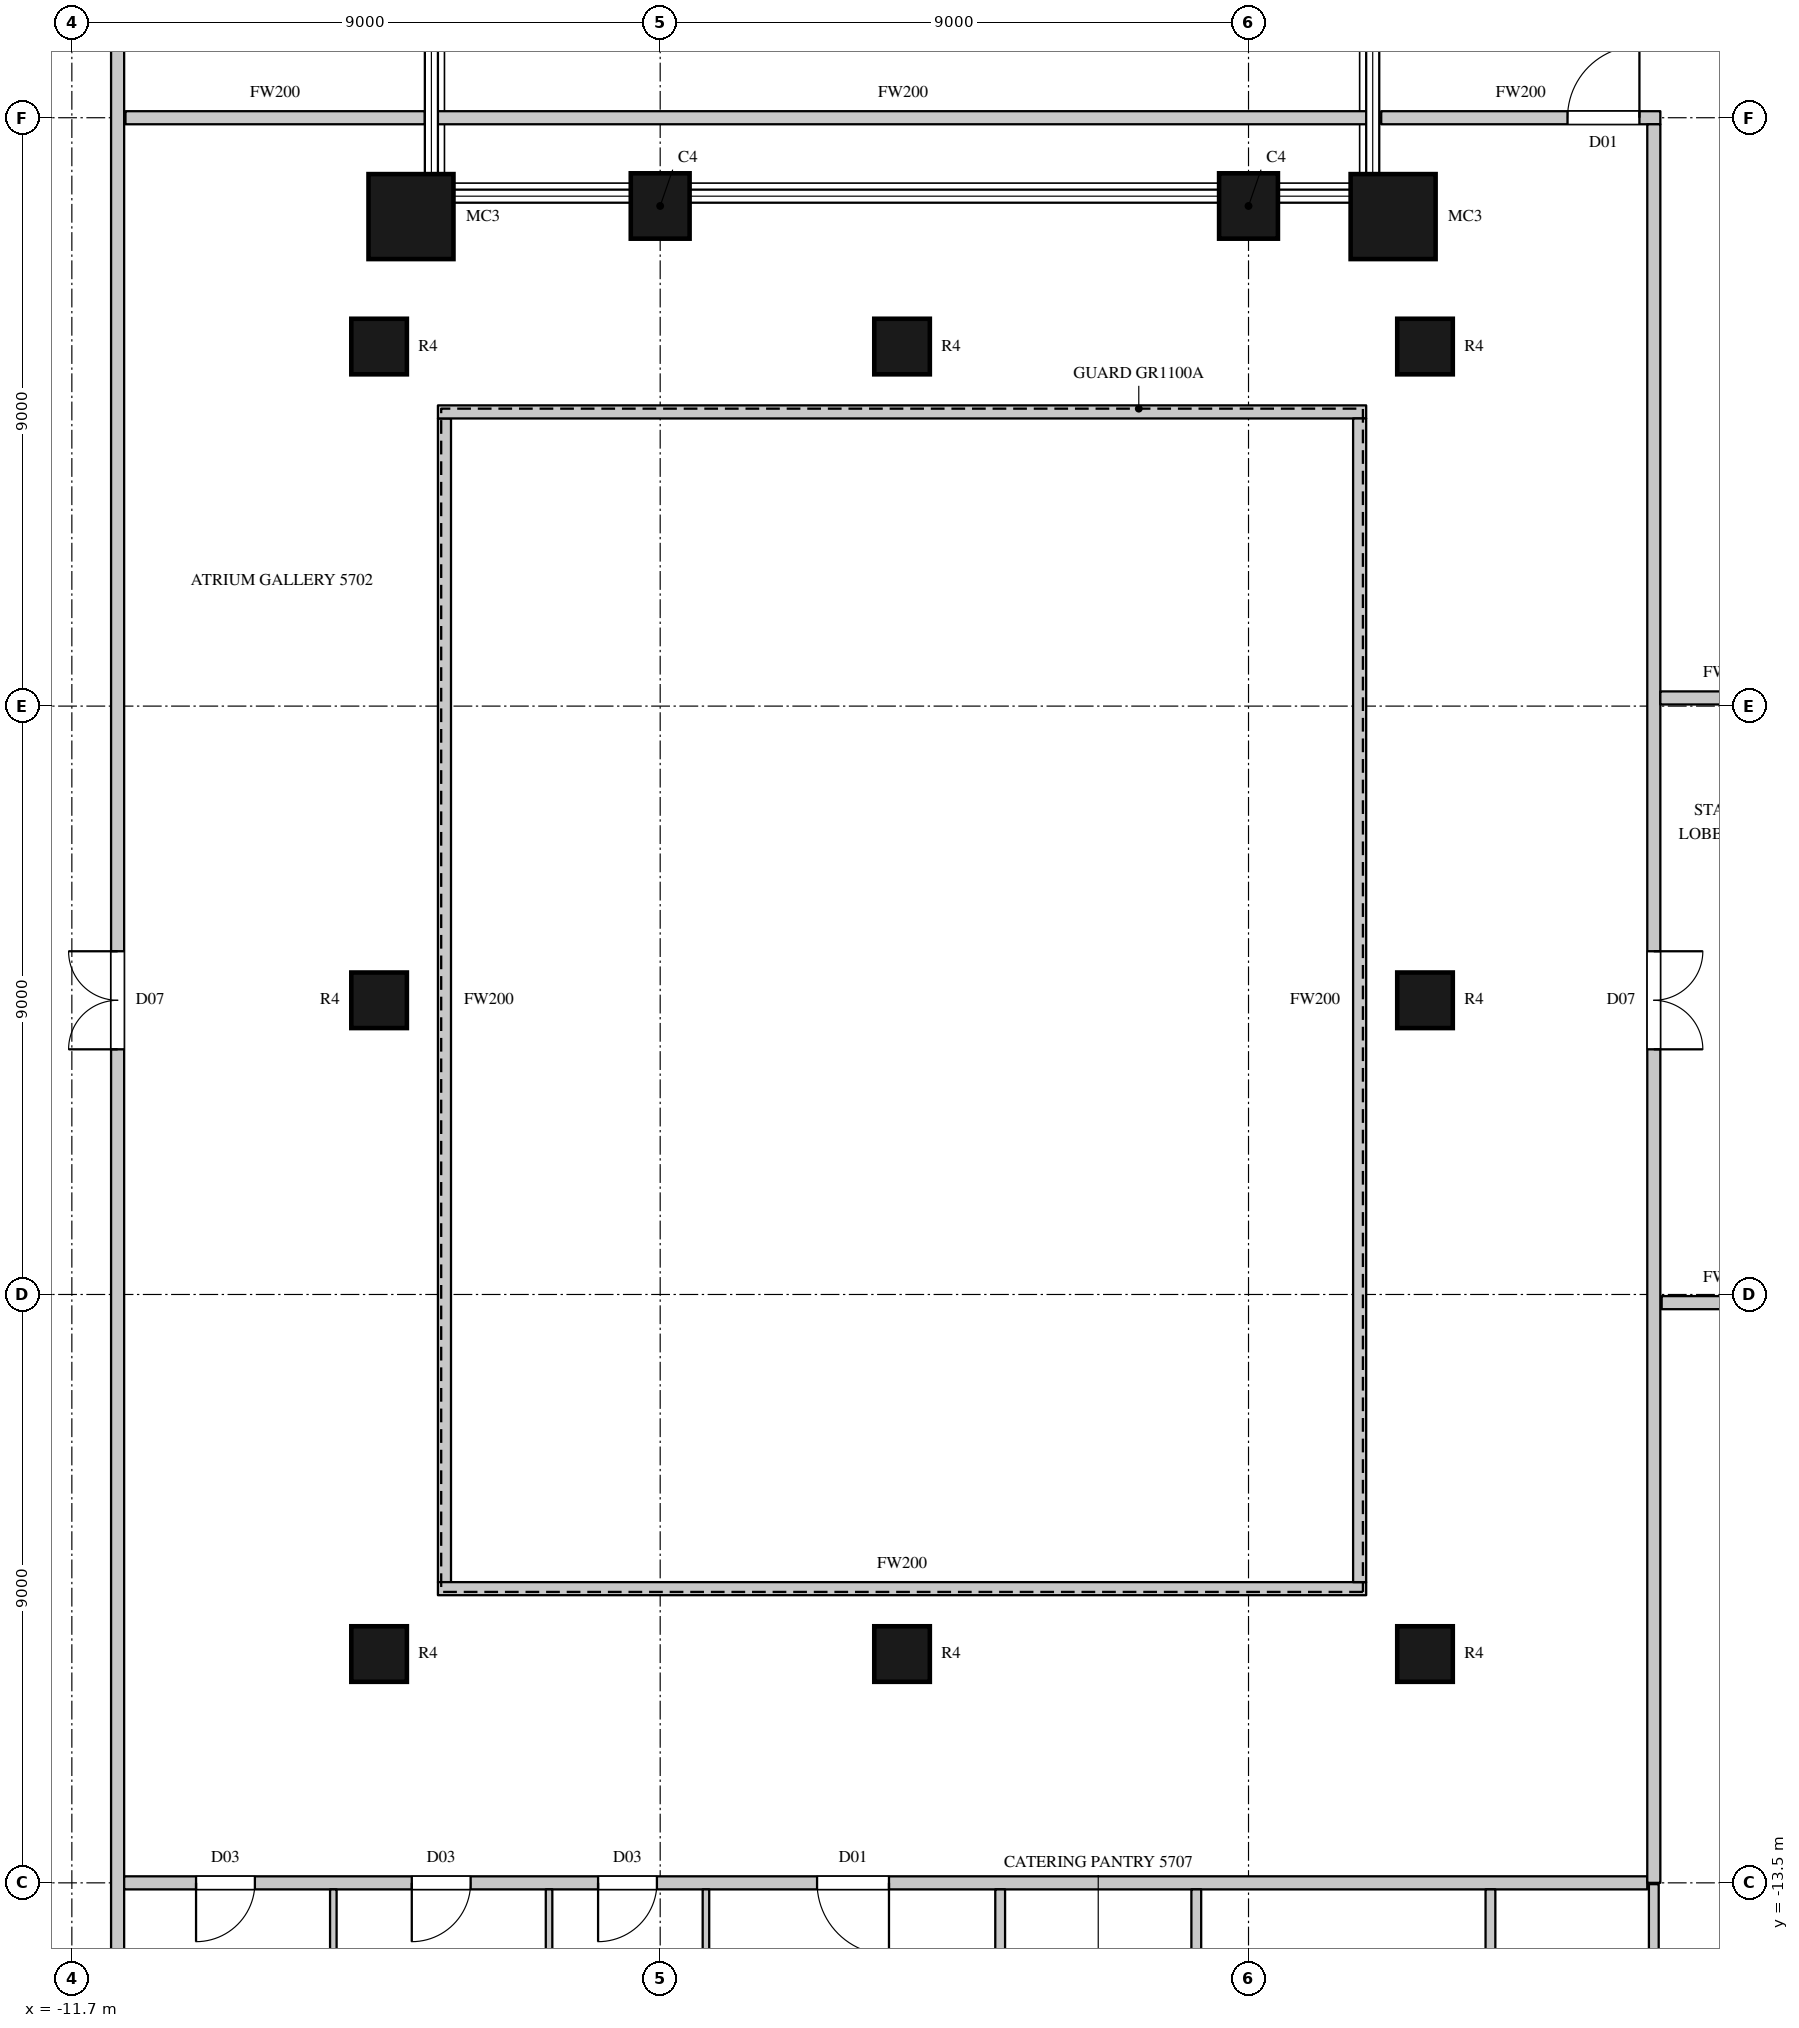
"""IFC4 building model, lengths in metres.
Left out: names, types, materials, properties, quantities, classifications, styles, units other than length and angle.
Written with IfcOpenShell. Run it as: python <this file> out.ifc"""

import sys

from ifc_helpers import new_model, si_unit, direction, frame, frame_2d, origin, origin_2d, place, context, subcontext, project, spatial, rectangle, circle, extrude, element, fill, save


model = new_model("IFC4")
c1 = context("Model", 3, precision=1e-05, world=origin(), true_north=direction((0.0, 1.0)))
c2 = subcontext(c1, "Body", "Model", "MODEL_VIEW")
j1 = project(units=[si_unit("LENGTHUNIT", "METRE"), si_unit("PLANEANGLEUNIT", "RADIAN")], contexts=[c1])
p1 = place(None, origin())
s1 = spatial("IfcSite", under=j1, at=p1, CompositionType="ELEMENT")
p2 = place(p1, origin())
s2 = spatial("IfcBuilding", under=s1, at=p2, CompositionType="ELEMENT")
p3 = place(p2, frame((0.0, 0.0, 255.7)))
s3 = spatial("IfcBuildingStorey", under=s2, at=p3, CompositionType="ELEMENT", Elevation=255.7)
p4 = place(p3, frame((8.512, 11.988, 0.0), z_axis=(0.0, 0.0, 1.0), x_axis=(1.0, 0.0, 0.0)))
e1 = element("IfcColumn", 1, at=p4, inside=s3, PredefinedType="COLUMN", context=c2, shape_type="SweptSolid", body=[
    extrude(circle(Radius=0.65, at=origin_2d()), origin(), (0.0, 0.0, 1.0), 4.1),
])
for number, where, z_axis, x_axis in (
    (2, (6.3, 12.15, 0.0), (0.0, 0.0, 1.0), (-1.0, 0.0, 0.0)),
    (3, (-2.7, 12.15, 0.0), (0.0, 0.0, 1.0), (-1.0, 0.0, 0.0)),
):
    element("IfcColumn", number, at=place(p3, frame(where, z_axis=z_axis, x_axis=x_axis)), inside=s3, PredefinedType="COLUMN", context=c2, shape_type="SweptSolid", body=[
        extrude(rectangle(XDim=0.9, YDim=1.0, at=origin_2d()), origin(), (0.0, 0.0, 1.0), 4.1),
    ])
p5 = place(p3, frame((-6.512, 11.988, 0.0), z_axis=(0.0, 0.0, 1.0), x_axis=(1.0, 0.0, 0.0)))
e4 = element("IfcColumn", 4, at=p5, inside=s3, PredefinedType="COLUMN", context=c2, shape_type="SweptSolid", body=[
    extrude(circle(Radius=0.65, at=origin_2d()), origin(), (0.0, 0.0, 1.0), 4.1),
])
for number, where, z_axis, x_axis in (
    (5, (-7.0, -10.0, 0.0), (0.0, 0.0, 1.0), (1.0, 0.0, 0.0)),
    (6, (-7.0, 0.0, 0.0), (0.0, 0.0, 1.0), (1.0, 0.0, 0.0)),
    (7, (-7.0, 10.0, 0.0), (0.0, 0.0, 1.0), (1.0, 0.0, 0.0)),
    (8, (1.0, -10.0, 0.0), (0.0, 0.0, 1.0), (1.0, 0.0, 0.0)),
    (9, (1.0, 10.0, 0.0), (0.0, 0.0, 1.0), (1.0, 0.0, 0.0)),
    (10, (9.0, -10.0, 0.0), (0.0, 0.0, 1.0), (1.0, 0.0, 0.0)),
    (11, (9.0, 0.0, 0.0), (0.0, 0.0, 1.0), (1.0, 0.0, 0.0)),
    (12, (9.0, 10.0, 0.0), (0.0, 0.0, 1.0), (1.0, 0.0, 0.0)),
):
    element("IfcColumn", number, at=place(p3, frame(where, z_axis=z_axis, x_axis=x_axis)), inside=s3, PredefinedType="COLUMN", context=c2, shape_type="SweptSolid", body=[
        extrude(circle(Radius=0.425, at=origin_2d()), origin(), (0.0, 0.0, 1.0), 4.1),
    ])
p6 = place(p3, frame((-11.0, -14.8, 0.0), z_axis=(0.0, 0.0, 1.0), x_axis=(0.0, 1.0, 0.0)))
e13 = element("IfcWall", 13, at=p6, inside=s3, PredefinedType="PARTITIONING", context=c2, shape_type="SweptSolid", body=[
    extrude(rectangle(XDim=29.5, YDim=0.2, at=frame_2d((14.75, 0.0))), origin(), (0.0, 0.0, 1.0), 3.8),
])
p7 = place(p6, frame((14.05, 0.0, 0.0)))
e14 = element("IfcOpeningElement", 14, at=p7, cuts=e13, PredefinedType="OPENING", context=c2, shape_type="SweptSolid", body=[
    extrude(rectangle(XDim=1.5, YDim=2.4, at=frame_2d((0.75, 1.2))), frame((0.0, 0.11, 0.0), z_axis=(0.0, -1.0, 0.0), x_axis=(1.0, 0.0, 0.0)), (0.0, 0.0, 1.0), 0.22),
])
p8 = place(p3, frame((-10.9, -13.5, 0.0), z_axis=(0.0, 0.0, 1.0), x_axis=(1.0, 0.0, 0.0)))
e15 = element("IfcWall", 15, at=p8, inside=s3, PredefinedType="PARTITIONING", context=c2, shape_type="SweptSolid", body=[
    extrude(rectangle(XDim=23.3, YDim=0.2, at=frame_2d((11.65, 0.0))), origin(), (0.0, 0.0, 1.0), 3.8),
])
p9 = place(p8, frame((1.1, 0.0, 0.0)))
e16 = element("IfcOpeningElement", 16, at=p9, cuts=e15, PredefinedType="OPENING", context=c2, shape_type="SweptSolid", body=[
    extrude(rectangle(XDim=0.9, YDim=2.2, at=frame_2d((0.45, 1.1))), frame((0.0, 0.11, 0.0), z_axis=(0.0, -1.0, 0.0), x_axis=(1.0, 0.0, 0.0)), (0.0, 0.0, 1.0), 0.22),
])
p10 = place(p8, frame((4.4, 0.0, 0.0)))
e17 = element("IfcOpeningElement", 17, at=p10, cuts=e15, PredefinedType="OPENING", context=c2, shape_type="SweptSolid", body=[
    extrude(rectangle(XDim=0.9, YDim=2.2, at=frame_2d((0.45, 1.1))), frame((0.0, 0.11, 0.0), z_axis=(0.0, -1.0, 0.0), x_axis=(1.0, 0.0, 0.0)), (0.0, 0.0, 1.0), 0.22),
])
p11 = place(p8, frame((7.25, 0.0, 0.0)))
e18 = element("IfcOpeningElement", 18, at=p11, cuts=e15, PredefinedType="OPENING", context=c2, shape_type="SweptSolid", body=[
    extrude(rectangle(XDim=0.9, YDim=2.2, at=frame_2d((0.45, 1.1))), frame((0.0, 0.11, 0.0), z_axis=(0.0, -1.0, 0.0), x_axis=(1.0, 0.0, 0.0)), (0.0, 0.0, 1.0), 0.22),
])
p12 = place(p8, frame((10.6, 0.0, 0.0)))
e19 = element("IfcOpeningElement", 19, at=p12, cuts=e15, PredefinedType="OPENING", context=c2, shape_type="SweptSolid", body=[
    extrude(rectangle(XDim=1.1, YDim=2.4, at=frame_2d((0.55, 1.2))), frame((0.0, 0.11, 0.0), z_axis=(0.0, -1.0, 0.0), x_axis=(1.0, 0.0, 0.0)), (0.0, 0.0, 1.0), 0.22),
])
p13 = place(p3, frame((-10.88, 13.5, 0.0), z_axis=(0.0, 0.0, 1.0), x_axis=(1.0, 0.0, 0.0)))
e20 = element("IfcWall", 20, at=p13, inside=s3, PredefinedType="PARTITIONING", context=c2, shape_type="SweptSolid", body=[
    extrude(rectangle(XDim=4.58, YDim=0.2, at=frame_2d((2.29, 0.0))), origin(), (0.0, 0.0, 1.0), 3.8),
])
p14 = place(p3, frame((-6.27, 13.5, 0.0), z_axis=(0.0, 0.0, 1.0), x_axis=(1.0, 0.0, 0.0)))
e21 = element("IfcWall", 21, at=p14, inside=s3, PredefinedType="PARTITIONING", context=c2, shape_type="SweptSolid", body=[
    extrude(rectangle(XDim=14.57, YDim=0.2, at=frame_2d((7.285, 0.0))), origin(), (0.0, 0.0, 1.0), 3.8),
])
p15 = place(p3, frame((-6.0, -8.9, 0.0), z_axis=(0.0, 0.0, 1.0), x_axis=(0.0, 1.0, 0.0)))
e22 = element("IfcWall", 22, at=p15, inside=s3, PredefinedType="PARTITIONING", context=c2, shape_type="SweptSolid", body=[
    extrude(rectangle(XDim=17.8, YDim=0.2, at=frame_2d((8.9, 0.0))), origin(), (0.0, 0.0, 1.0), 3.8),
])
for number, where, z_axis, x_axis in (
    (23, (-6.1, -9.0, 0.0), (0.0, 0.0, 1.0), (1.0, 0.0, 0.0)),
    (24, (-6.1, 9.0, 0.0), (0.0, 0.0, 1.0), (1.0, 0.0, 0.0)),
):
    element("IfcWall", number, at=place(p3, frame(where, z_axis=z_axis, x_axis=x_axis)), inside=s3, PredefinedType="PARTITIONING", context=c2, shape_type="SweptSolid", body=[
        extrude(rectangle(XDim=14.2, YDim=0.2, at=frame_2d((7.1, 0.0))), origin(), (0.0, 0.0, 1.0), 3.8),
    ])
p16 = place(p3, frame((8.0, -8.9, 0.0), z_axis=(0.0, 0.0, 1.0), x_axis=(0.0, 1.0, 0.0)))
e25 = element("IfcWall", 25, at=p16, inside=s3, PredefinedType="PARTITIONING", context=c2, shape_type="SweptSolid", body=[
    extrude(rectangle(XDim=17.8, YDim=0.2, at=frame_2d((8.9, 0.0))), origin(), (0.0, 0.0, 1.0), 3.8),
])
p17 = place(p3, frame((8.33, 13.5, 0.0), z_axis=(0.0, 0.0, 1.0), x_axis=(1.0, 0.0, 0.0)))
e26 = element("IfcWall", 26, at=p17, inside=s3, PredefinedType="PARTITIONING", context=c2, shape_type="SweptSolid", body=[
    extrude(rectangle(XDim=4.27, YDim=0.2, at=frame_2d((2.135, 0.0))), origin(), (0.0, 0.0, 1.0), 3.8),
])
p18 = place(p17, frame((2.85, 0.0, 0.0)))
e27 = element("IfcOpeningElement", 27, at=p18, cuts=e26, PredefinedType="OPENING", context=c2, shape_type="SweptSolid", body=[
    extrude(rectangle(XDim=1.1, YDim=2.4, at=frame_2d((0.55, 1.2))), frame((0.0, 0.11, 0.0), z_axis=(0.0, -1.0, 0.0), x_axis=(1.0, 0.0, 0.0)), (0.0, 0.0, 1.0), 0.22),
])
p19 = place(p3, frame((12.5, -13.5, 0.0), z_axis=(0.0, 0.0, 1.0), x_axis=(0.0, 1.0, 0.0)))
e28 = element("IfcWall", 28, at=p19, inside=s3, PredefinedType="PARTITIONING", context=c2, shape_type="SweptSolid", body=[
    extrude(rectangle(XDim=26.9, YDim=0.2, at=frame_2d((13.45, 0.0))), origin(), (0.0, 0.0, 1.0), 3.8),
])
p20 = place(p19, frame((12.75, 0.0, 0.0)))
e29 = element("IfcOpeningElement", 29, at=p20, cuts=e28, PredefinedType="OPENING", context=c2, shape_type="SweptSolid", body=[
    extrude(rectangle(XDim=1.5, YDim=2.4, at=frame_2d((0.75, 1.2))), frame((0.0, 0.11, 0.0), z_axis=(0.0, -1.0, 0.0), x_axis=(1.0, 0.0, 0.0)), (0.0, 0.0, 1.0), 0.22),
])
p21 = place(p3, frame((12.6, 4.625, 0.0), z_axis=(0.0, 0.0, 1.0), x_axis=(1.0, 0.0, 0.0)))
e30 = element("IfcWall", 30, at=p21, inside=s3, PredefinedType="PARTITIONING", context=c2, shape_type="SweptSolid", body=[
    extrude(rectangle(XDim=2.075, YDim=0.2, at=frame_2d((1.038, 0.0))), origin(), (0.0, 0.0, 1.0), 3.8),
])
p22 = place(p3, frame((12.62, -4.625, 0.0), z_axis=(0.0, 0.0, 1.0), x_axis=(1.0, 0.0, 0.0)))
e31 = element("IfcWall", 31, at=p22, inside=s3, PredefinedType="PARTITIONING", context=c2, shape_type="SweptSolid", body=[
    extrude(rectangle(XDim=2.035, YDim=0.2, at=frame_2d((1.018, 0.0))), origin(), (0.0, 0.0, 1.0), 3.8),
])
p23 = place(p3, frame((2.501, -17.625, 0.0), z_axis=(0.0, 0.0, 1.0), x_axis=(0.0, 1.0, 0.0)))
e32 = element("IfcWall", 32, at=p23, inside=s3, PredefinedType="PARTITIONING", context=c2, shape_type="SweptSolid", body=[
    extrude(rectangle(XDim=4.025, YDim=0.15, at=frame_2d((2.012, 0.0))), origin(), (0.0, 0.0, 1.0), 3.8),
])
p24 = place(p23, frame((1.55, 0.0, 0.0)))
e33 = element("IfcOpeningElement", 33, at=p24, cuts=e32, PredefinedType="OPENING", context=c2, shape_type="SweptSolid", body=[
    extrude(rectangle(XDim=0.95, YDim=2.2, at=frame_2d((0.475, 1.1))), frame((0.0, 0.085, 0.0), z_axis=(0.0, -1.0, 0.0), x_axis=(1.0, 0.0, 0.0)), (0.0, 0.0, 1.0), 0.17),
])
for number, where, z_axis, x_axis in (
    (34, (5.501, -17.625, 0.0), (0.0, 0.0, 1.0), (0.0, 1.0, 0.0)),
    (35, (10.001, -17.625, 0.0), (0.0, 0.0, 1.0), (0.0, 1.0, 0.0)),
):
    element("IfcWall", number, at=place(p3, frame(where, z_axis=z_axis, x_axis=x_axis)), inside=s3, PredefinedType="PARTITIONING", context=c2, shape_type="SweptSolid", body=[
        extrude(rectangle(XDim=4.025, YDim=0.15, at=frame_2d((2.012, 0.0))), origin(), (0.0, 0.0, 1.0), 3.8),
    ])
p25 = place(p3, frame((12.5, -20.095, 0.0), z_axis=(0.0, 0.0, 1.0), x_axis=(0.0, 1.0, 0.0)))
e36 = element("IfcWall", 36, at=p25, inside=s3, PredefinedType="PARTITIONING", context=c2, shape_type="SweptSolid", body=[
    extrude(rectangle(XDim=6.575, YDim=0.15, at=frame_2d((3.288, 0.0))), origin(), (0.0, 0.0, 1.0), 3.8),
])
for number, where, z_axis, x_axis in (
    (37, (-7.7, -24.04, 0.0), (0.0, 0.0, 1.0), (0.0, 1.0, 0.0)),
    (38, (-4.4, -24.04, 0.0), (0.0, 0.0, 1.0), (0.0, 1.0, 0.0)),
):
    element("IfcWall", number, at=place(p3, frame(where, z_axis=z_axis, x_axis=x_axis)), inside=s3, PredefinedType="PARTITIONING", context=c2, shape_type="SweptSolid", body=[
        extrude(rectangle(XDim=10.44, YDim=0.1, at=frame_2d((5.22, 0.0))), origin(), (0.0, 0.0, 1.0), 3.8),
    ])
p26 = place(p3, frame((-2.0, -23.447, 0.0), z_axis=(0.0, 0.0, 1.0), x_axis=(0.0, 1.0, 0.0)))
e39 = element("IfcWall", 39, at=p26, inside=s3, PredefinedType="PARTITIONING", context=c2, shape_type="SweptSolid", body=[
    extrude(rectangle(XDim=9.847, YDim=0.1, at=frame_2d((4.924, 0.0))), origin(), (0.0, 0.0, 1.0), 3.8),
])
p27 = place(p7, origin())
e40 = element("IfcDoor", 40, at=p27, inside=s3, OperationType="DOUBLE_DOOR_SINGLE_SWING", PredefinedType="DOOR", context=c2, shape_type="SweptSolid", body=[
    extrude(rectangle(XDim=1.5, YDim=2.4, at=frame_2d((0.75, 1.2))), frame((0.0, 0.025, 0.0), z_axis=(0.0, -1.0, 0.0), x_axis=(1.0, 0.0, 0.0)), (0.0, 0.0, 1.0), 0.05),
])
fill(e14, e40)
p28 = place(p20, origin())
e41 = element("IfcDoor", 41, at=p28, inside=s3, OperationType="DOUBLE_DOOR_SINGLE_SWING", PredefinedType="DOOR", context=c2, shape_type="SweptSolid", body=[
    extrude(rectangle(XDim=1.5, YDim=2.4, at=frame_2d((0.75, 1.2))), frame((0.0, 0.025, 0.0), z_axis=(0.0, -1.0, 0.0), x_axis=(1.0, 0.0, 0.0)), (0.0, 0.0, 1.0), 0.05),
])
fill(e29, e41)
p29 = place(p9, origin())
e42 = element("IfcDoor", 42, at=p29, inside=s3, OperationType="SINGLE_SWING_RIGHT", PredefinedType="DOOR", context=c2, shape_type="SweptSolid", body=[
    extrude(rectangle(XDim=0.9, YDim=2.2, at=frame_2d((0.45, 1.1))), frame((0.0, 0.025, 0.0), z_axis=(0.0, -1.0, 0.0), x_axis=(1.0, 0.0, 0.0)), (0.0, 0.0, 1.0), 0.05),
])
fill(e16, e42)
p30 = place(p10, origin())
e43 = element("IfcDoor", 43, at=p30, inside=s3, OperationType="SINGLE_SWING_RIGHT", PredefinedType="DOOR", context=c2, shape_type="SweptSolid", body=[
    extrude(rectangle(XDim=0.9, YDim=2.2, at=frame_2d((0.45, 1.1))), frame((0.0, 0.025, 0.0), z_axis=(0.0, -1.0, 0.0), x_axis=(1.0, 0.0, 0.0)), (0.0, 0.0, 1.0), 0.05),
])
fill(e17, e43)
p31 = place(p11, origin())
e44 = element("IfcDoor", 44, at=p31, inside=s3, OperationType="SINGLE_SWING_RIGHT", PredefinedType="DOOR", context=c2, shape_type="SweptSolid", body=[
    extrude(rectangle(XDim=0.9, YDim=2.2, at=frame_2d((0.45, 1.1))), frame((0.0, 0.025, 0.0), z_axis=(0.0, -1.0, 0.0), x_axis=(1.0, 0.0, 0.0)), (0.0, 0.0, 1.0), 0.05),
])
fill(e18, e44)
p32 = place(p12, origin())
e45 = element("IfcDoor", 45, at=p32, inside=s3, OperationType="SINGLE_SWING_LEFT", PredefinedType="DOOR", context=c2, shape_type="SweptSolid", body=[
    extrude(rectangle(XDim=1.1, YDim=2.4, at=frame_2d((0.55, 1.2))), frame((0.0, 0.025, 0.0), z_axis=(0.0, -1.0, 0.0), x_axis=(1.0, 0.0, 0.0)), (0.0, 0.0, 1.0), 0.05),
])
fill(e19, e45)
p33 = place(p18, origin())
e46 = element("IfcDoor", 46, at=p33, inside=s3, OperationType="SINGLE_SWING_RIGHT", PredefinedType="DOOR", context=c2, shape_type="SweptSolid", body=[
    extrude(rectangle(XDim=1.1, YDim=2.4, at=frame_2d((0.55, 1.2))), frame((0.0, 0.025, 0.0), z_axis=(0.0, -1.0, 0.0), x_axis=(1.0, 0.0, 0.0)), (0.0, 0.0, 1.0), 0.05),
])
fill(e27, e46)
save(model, sys.argv[1])
